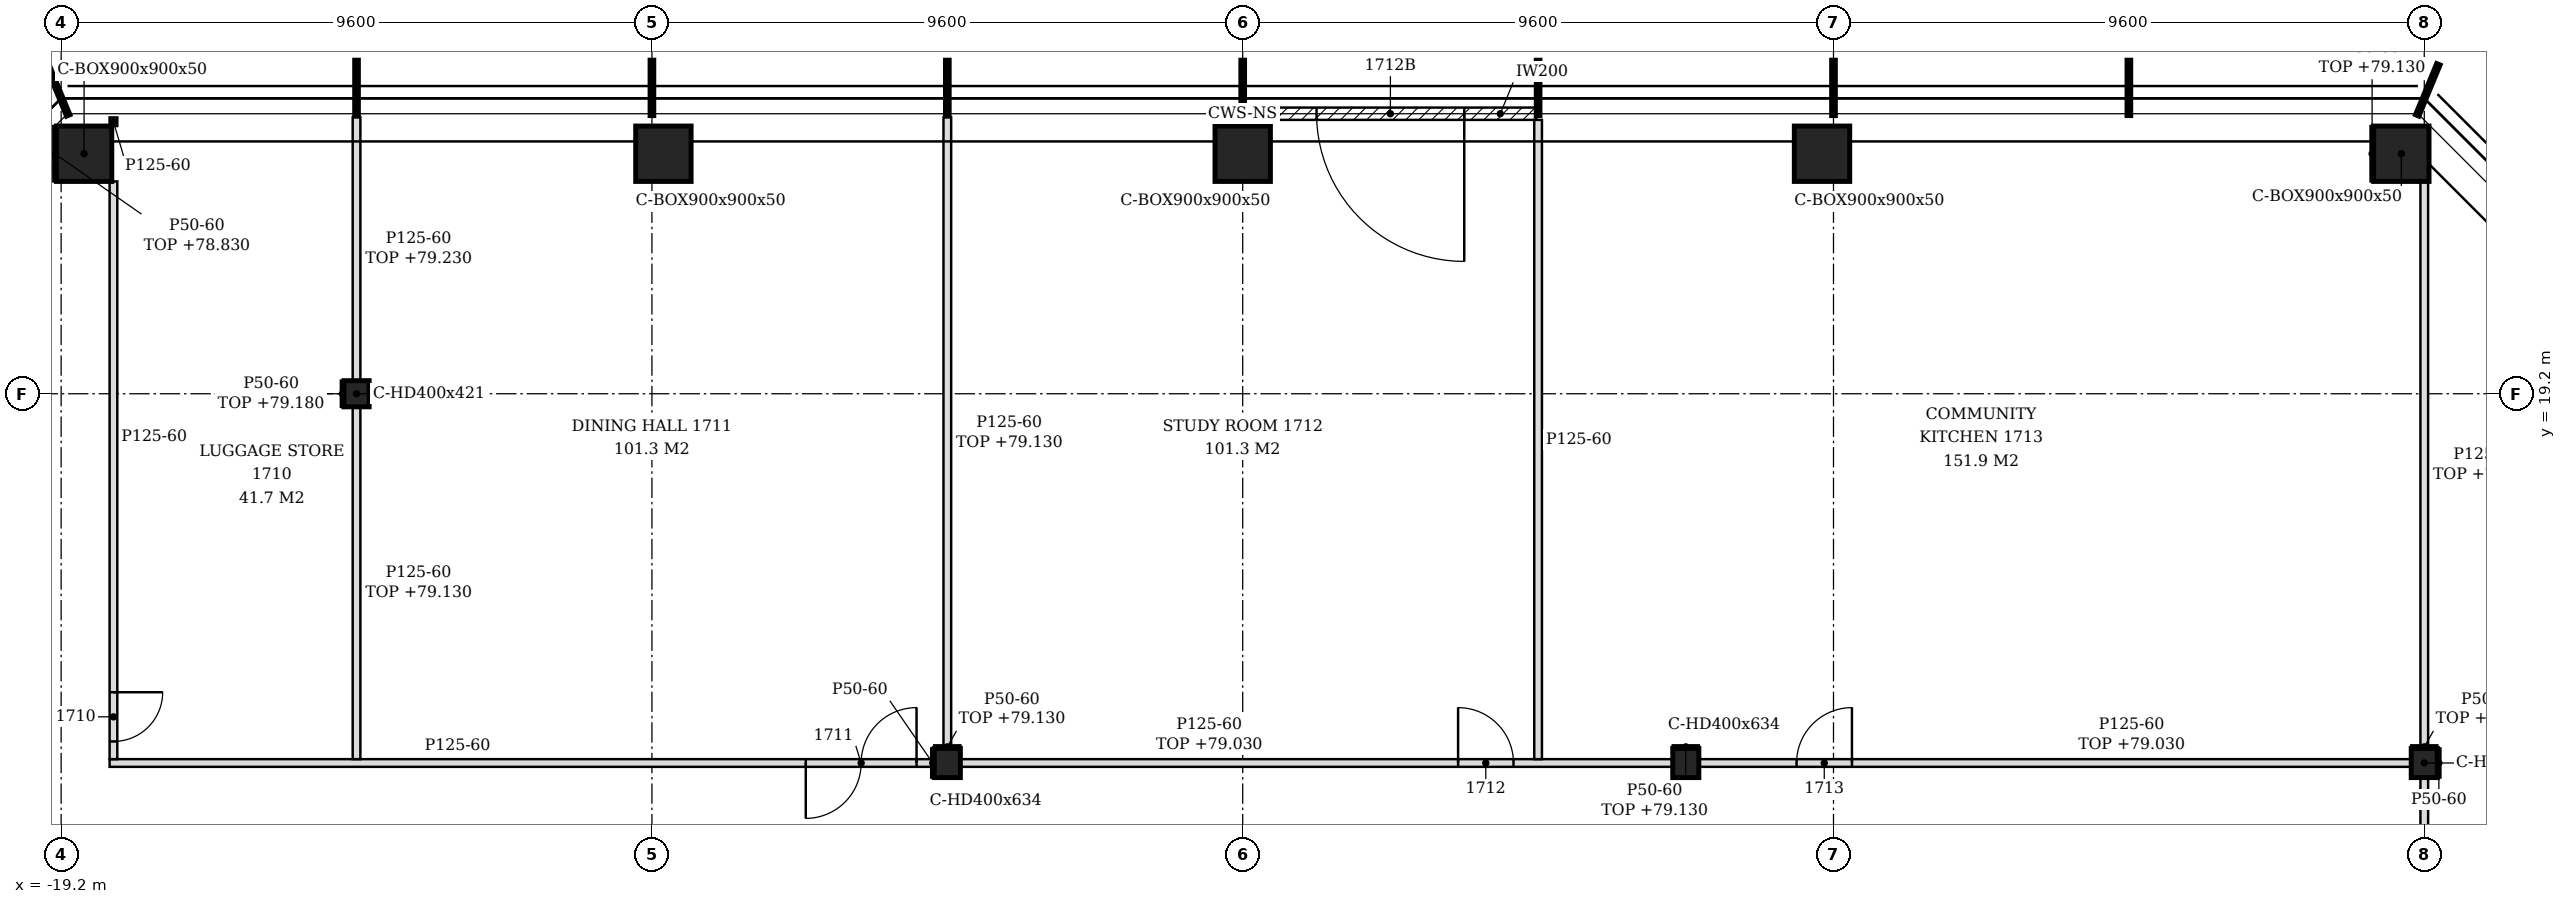
"""IFC4 building model, lengths in metres.
Left out: names, types, materials, properties, quantities, classifications, styles, units other than length and angle.
Written with IfcOpenShell. Run it as: python <this file> out.ifc"""

import sys

from ifc_helpers import new_model, si_unit, direction, frame, frame_2d, origin, origin_2d, place, context, subcontext, project, spatial, polyline, rectangle, hollow_rectangle, i_section, outline, extrude, element, fill, save


model = new_model("IFC4")
c1 = context("Model", 3, precision=1e-05, world=origin(), true_north=direction((0.0, 1.0)))
c2 = subcontext(c1, "Body", "Model", "MODEL_VIEW")
j1 = project(units=[si_unit("LENGTHUNIT", "METRE"), si_unit("PLANEANGLEUNIT", "RADIAN")], contexts=[c1])
p1 = place(None, origin())
s1 = spatial("IfcSite", under=j1, at=p1, CompositionType="ELEMENT")
p2 = place(p1, origin())
s2 = spatial("IfcBuilding", under=s1, at=p2, CompositionType="ELEMENT")
p3 = place(p2, frame((0.0, 0.0, 76.2)))
s3 = spatial("IfcBuildingStorey", under=s2, at=p3, CompositionType="ELEMENT", Elevation=76.2)
for number, where, z_axis, x_axis in (
    (1, (18.827, 23.1, -0.15), (0.0, 0.0, 1.0), (1.0, 0.0, 0.0)),
    (2, (9.414, 23.1, -0.15), (0.0, 0.0, 1.0), (1.0, 0.0, 0.0)),
    (3, (0.0, 23.1, -0.15), (0.0, 0.0, 1.0), (1.0, 0.0, 0.0)),
    (4, (-9.414, 23.1, -0.15), (0.0, 0.0, 1.0), (1.0, 0.0, 0.0)),
    (5, (-18.827, 23.1, -0.15), (0.0, 0.0, 1.0), (1.0, 0.0, 0.0)),
):
    element("IfcColumn", number, at=place(p3, frame(where, z_axis=z_axis, x_axis=x_axis)), inside=s3, PredefinedType="COLUMN", context=c2, shape_type="SweptSolid", body=[
        extrude(hollow_rectangle(XDim=0.9, YDim=0.9, WallThickness=0.05, at=origin_2d()), origin(), (0.0, 0.0, 1.0), 3.6),
    ])
for number, where, z_axis, x_axis in (
    (6, (-4.8, 13.2, -0.15), (0.0, 0.0, 1.0), (1.0, 0.0, 0.0)),
    (7, (7.2, 13.2, -0.15), (0.0, 0.0, 1.0), (1.0, 0.0, 0.0)),
    (8, (19.2, 13.2, -0.15), (0.0, 0.0, 1.0), (1.0, 0.0, 0.0)),
):
    element("IfcColumn", number, at=place(p3, frame(where, z_axis=z_axis, x_axis=x_axis)), inside=s3, PredefinedType="COLUMN", context=c2, shape_type="SweptSolid", body=[
        extrude(i_section(OverallWidth=0.424, OverallDepth=0.474, WebThickness=0.048, FlangeThickness=0.077, FilletRadius=0.015, at=origin_2d()), origin(), (0.0, 0.0, 1.0), 3.6),
    ])
p4 = place(p3, frame((-14.4, 19.2, -0.15), z_axis=(0.0, 0.0, 1.0), x_axis=(1.0, 0.0, 0.0)))
e9 = element("IfcColumn", 9, at=p4, inside=s3, PredefinedType="COLUMN", context=c2, shape_type="SweptSolid", body=[
    extrude(i_section(OverallWidth=0.409, OverallDepth=0.425, WebThickness=0.033, FlangeThickness=0.052, FilletRadius=0.015, at=origin_2d()), origin(), (0.0, 0.0, 1.0), 3.6),
])
p5 = place(p3, frame((4.77, 23.75, 0.0), z_axis=(0.0, 0.0, 1.0), x_axis=(-1.0, 0.0, 0.0)))
e10 = element("IfcWall", 10, at=p5, inside=s3, PredefinedType="NOTDEFINED", context=c2, shape_type="SweptSolid", body=[
    extrude(rectangle(XDim=4.74, YDim=0.2, at=frame_2d((2.37, 0.0))), origin(), (0.0, 0.0, 1.0), 3.45),
])
p6 = place(p5, frame((1.17, 0.0, 0.0)))
e11 = element("IfcOpeningElement", 11, at=p6, cuts=e10, PredefinedType="OPENING", context=c2, shape_type="SweptSolid", body=[
    extrude(rectangle(XDim=2.4, YDim=2.4, at=frame_2d((1.2, 1.2))), frame((0.0, 0.11, 0.0), z_axis=(0.0, -1.0, 0.0), x_axis=(1.0, 0.0, 0.0)), (0.0, 0.0, 1.0), 0.22),
])
p7 = place(p3, frame((19.2, 2.637, 0.0), z_axis=(0.0, 0.0, 1.0), x_axis=(0.0, 1.0, 0.0)))
e12 = element("IfcWall", 12, at=p7, inside=s3, PredefinedType="PARTITIONING", context=c2, shape_type="SweptSolid", body=[
    extrude(rectangle(XDim=10.326, YDim=0.125, at=frame_2d((5.163, 0.0))), origin(), (0.0, 0.0, 1.0), 2.83),
])
p8 = place(p7, frame((5.763, 0.0, 0.0)))
e13 = element("IfcOpeningElement", 13, at=p8, cuts=e12, PredefinedType="OPENING", context=c2, shape_type="SweptSolid", body=[
    extrude(rectangle(XDim=0.9, YDim=2.1, at=frame_2d((0.45, 1.05))), frame((0.0, 0.073, 0.0), z_axis=(0.0, -1.0, 0.0), x_axis=(1.0, 0.0, 0.0)), (0.0, 0.0, 1.0), 0.145),
])
p9 = place(p3, frame((-18.413, 13.2, 0.0), z_axis=(0.0, 0.0, 1.0), x_axis=(1.0, 0.0, 0.0)))
e14 = element("IfcWall", 14, at=p9, inside=s3, PredefinedType="PARTITIONING", context=c2, shape_type="SweptSolid", body=[
    extrude(outline(polyline([(0.0, 0.0), (13.401, 0.0), (13.4, 3.45), (4.163, 3.45), (4.16, 2.93), (3.863, 2.93), (3.861, 3.45), (0.0, 3.45), (0.0, 0.0)])), frame((0.0, 0.062, 0.0), z_axis=(0.0, -1.0, 0.0), x_axis=(1.0, 0.0, 0.0)), (0.0, 0.0, 1.0), 0.125),
])
p10 = place(p9, frame((11.312, 0.0, 0.0)))
e15 = element("IfcOpeningElement", 15, at=p10, cuts=e14, PredefinedType="OPENING", context=c2, shape_type="SweptSolid", body=[
    extrude(rectangle(XDim=1.8, YDim=2.1, at=frame_2d((0.9, 1.05))), frame((0.0, 0.073, 0.0), z_axis=(0.0, -1.0, 0.0), x_axis=(1.0, 0.0, 0.0)), (0.0, 0.0, 1.0), 0.145),
])
p11 = place(p3, frame((-4.588, 13.2, 0.0), z_axis=(0.0, 0.0, 1.0), x_axis=(1.0, 0.0, 0.0)))
e16 = element("IfcWall", 16, at=p11, inside=s3, PredefinedType="PARTITIONING", context=c2, shape_type="SweptSolid", body=[
    extrude(rectangle(XDim=11.576, YDim=0.125, at=frame_2d((5.788, 0.0))), origin(), (0.0, 0.0, 1.0), 2.83),
])
p12 = place(p11, frame((8.088, 0.0, 0.0)))
e17 = element("IfcOpeningElement", 17, at=p12, cuts=e16, PredefinedType="OPENING", context=c2, shape_type="SweptSolid", body=[
    extrude(rectangle(XDim=0.9, YDim=2.1, at=frame_2d((0.45, 1.05))), frame((0.0, 0.073, 0.0), z_axis=(0.0, -1.0, 0.0), x_axis=(1.0, 0.0, 0.0)), (0.0, 0.0, 1.0), 0.145),
])
p13 = place(p3, frame((7.412, 13.2, 0.0), z_axis=(0.0, 0.0, 1.0), x_axis=(1.0, 0.0, 0.0)))
e18 = element("IfcWall", 18, at=p13, inside=s3, PredefinedType="PARTITIONING", context=c2, shape_type="SweptSolid", body=[
    extrude(rectangle(XDim=11.576, YDim=0.125, at=frame_2d((5.788, 0.0))), origin(), (0.0, 0.0, 1.0), 2.83),
])
p14 = place(p13, frame((1.588, 0.0, 0.0)))
e19 = element("IfcOpeningElement", 19, at=p14, cuts=e18, PredefinedType="OPENING", context=c2, shape_type="SweptSolid", body=[
    extrude(rectangle(XDim=0.9, YDim=2.1, at=frame_2d((0.45, 1.05))), frame((0.0, 0.073, 0.0), z_axis=(0.0, -1.0, 0.0), x_axis=(1.0, 0.0, 0.0)), (0.0, 0.0, 1.0), 0.145),
])
p15 = place(p3, frame((-18.35, 13.262, 0.0), z_axis=(0.0, 0.0, 1.0), x_axis=(0.0, 1.0, 0.0)))
e20 = element("IfcWall", 20, at=p15, inside=s3, PredefinedType="PARTITIONING", context=c2, shape_type="SweptSolid", body=[
    extrude(outline(polyline([(0.0, 0.0), (9.387, 0.0), (9.387, 3.45), (6.032, 3.45), (6.031, 2.98), (5.843, 2.98), (5.841, 3.45), (1.248, 3.45), (1.246, 2.83), (1.028, 2.83), (1.025, 3.45), (0.0, 3.45), (0.0, 0.0)])), frame((0.0, 0.062, 0.0), z_axis=(0.0, -1.0, 0.0), x_axis=(1.0, 0.0, 0.0)), (0.0, 0.0, 1.0), 0.125),
])
p16 = place(p15, frame((0.288, 0.0, 0.0)))
e21 = element("IfcOpeningElement", 21, at=p16, cuts=e20, PredefinedType="OPENING", context=c2, shape_type="SweptSolid", body=[
    extrude(rectangle(XDim=0.8, YDim=2.1, at=frame_2d((0.4, 1.05))), frame((0.0, 0.073, 0.0), z_axis=(0.0, -1.0, 0.0), x_axis=(1.0, 0.0, 0.0)), (0.0, 0.0, 1.0), 0.145),
])
p17 = place(p3, frame((-14.4, 13.262, 0.0), z_axis=(0.0, 0.0, 1.0), x_axis=(0.0, 1.0, 0.0)))
e22 = element("IfcWall", 22, at=p17, inside=s3, PredefinedType="PARTITIONING", context=c2, shape_type="SweptSolid", body=[
    extrude(rectangle(XDim=5.725, YDim=0.125, at=frame_2d((2.863, 0.0))), origin(), (0.0, 0.0, 1.0), 2.93),
])
p18 = place(p3, frame((4.8, 13.262, 0.0), z_axis=(0.0, 0.0, 1.0), x_axis=(0.0, 1.0, 0.0)))
e23 = element("IfcWall", 23, at=p18, inside=s3, PredefinedType="PARTITIONING", context=c2, shape_type="SweptSolid", body=[
    extrude(outline(polyline([(0.0, 0.0), (10.387, 0.0), (10.387, 3.45), (9.988, 3.45), (9.986, 2.93), (9.688, 2.93), (9.686, 3.45), (6.042, 3.45), (6.041, 2.88), (5.833, 2.88), (5.831, 3.45), (0.087, 3.45), (0.085, 2.83), (0.0, 2.83), (0.0, 0.0)])), frame((0.0, 0.062, 0.0), z_axis=(0.0, -1.0, 0.0), x_axis=(1.0, 0.0, 0.0)), (0.0, 0.0, 1.0), 0.125),
])
p19 = place(p3, frame((-4.8, 13.437, 0.0), z_axis=(0.0, 0.0, 1.0), x_axis=(0.0, 1.0, 0.0)))
e24 = element("IfcWall", 24, at=p19, inside=s3, PredefinedType="PARTITIONING", context=c2, shape_type="SweptSolid", body=[
    extrude(rectangle(XDim=10.253, YDim=0.125, at=frame_2d((5.126, 0.0))), origin(), (0.0, 0.0, 1.0), 2.93),
])
p20 = place(p3, frame((19.2, 13.437, 0.0), z_axis=(0.0, 0.0, 1.0), x_axis=(0.0, 1.0, 0.0)))
e25 = element("IfcWall", 25, at=p20, inside=s3, PredefinedType="PARTITIONING", context=c2, shape_type="SweptSolid", body=[
    extrude(outline(polyline([(0.0, 0.0), (9.213, 0.0), (9.213, 2.63), (8.733, 2.63), (8.731, 2.93), (0.0, 2.93), (0.0, 0.0)])), frame((0.0, 0.062, 0.0), z_axis=(0.0, -1.0, 0.0), x_axis=(1.0, 0.0, 0.0)), (0.0, 0.0, 1.0), 0.125),
])
p21 = place(p3, frame((-14.4, 19.413, 0.0), z_axis=(0.0, 0.0, 1.0), x_axis=(0.0, 1.0, 0.0)))
e26 = element("IfcWall", 26, at=p21, inside=s3, PredefinedType="PARTITIONING", context=c2, shape_type="SweptSolid", body=[
    extrude(outline(polyline([(0.0, 0.0), (4.277, 0.0), (4.278, 3.03), (3.837, 3.03), (3.835, 2.93), (3.538, 2.93), (3.535, 3.03), (0.0, 3.03), (0.0, 0.0)])), frame((0.0, 0.062, 0.0), z_axis=(0.0, -1.0, 0.0), x_axis=(1.0, 0.0, 0.0)), (0.0, 0.0, 1.0), 0.125),
])
p22 = place(p3, frame((-18.35, 23.55, 0.0), z_axis=(0.0, 0.0, 1.0), x_axis=(0.0, 1.0, 0.0)))
e27 = element("IfcWall", 27, at=p22, inside=s3, PredefinedType="PARTITIONING", context=c2, shape_type="SweptSolid", body=[
    extrude(rectangle(XDim=0.14, YDim=0.125, at=frame_2d((0.07, 0.0))), origin(), (0.0, 0.0, 1.0), 3.45),
])
p23 = place(p3, frame((19.437, 12.963, 0.0), z_axis=(0.0, 0.0, 1.0), x_axis=(0.0, 1.0, 0.0)))
e28 = element("IfcWall", 28, at=p23, inside=s3, PredefinedType="PARTITIONING", context=c2, shape_type="SweptSolid", body=[
    extrude(rectangle(XDim=0.474, YDim=0.05, at=frame_2d((0.237, 0.0))), origin(), (0.0, 0.0, 1.0), 3.45),
])
for number, where, z_axis, x_axis in (
    (29, (-5.012, 13.462, 0.0), (0.0, 0.0, 1.0), (1.0, 0.0, 0.0)),
    (30, (6.988, 13.462, 0.0), (0.0, 0.0, 1.0), (1.0, 0.0, 0.0)),
    (31, (18.988, 13.462, 0.0), (0.0, 0.0, 1.0), (1.0, 0.0, 0.0)),
):
    element("IfcWall", number, at=place(p3, frame(where, z_axis=z_axis, x_axis=x_axis)), inside=s3, PredefinedType="PARTITIONING", context=c2, shape_type="SweptSolid", body=[
        extrude(rectangle(XDim=0.424, YDim=0.05, at=frame_2d((0.212, 0.0))), origin(), (0.0, 0.0, 1.0), 2.93),
    ])
p24 = place(p3, frame((18.352, 22.65, 0.0), z_axis=(0.0, 0.0, 1.0), x_axis=(0.0, 1.0, 0.0)))
e32 = element("IfcWall", 32, at=p24, inside=s3, PredefinedType="PARTITIONING", context=c2, shape_type="SweptSolid", body=[
    extrude(rectangle(XDim=0.9, YDim=0.05, at=frame_2d((0.45, 0.0))), origin(), (0.0, 0.0, 1.0), 2.93),
])
p25 = place(p3, frame((-19.302, 22.65, 0.0), z_axis=(0.0, 0.0, 1.0), x_axis=(0.0, 1.0, 0.0)))
e33 = element("IfcWall", 33, at=p25, inside=s3, PredefinedType="PARTITIONING", context=c2, shape_type="SweptSolid", body=[
    extrude(rectangle(XDim=0.9, YDim=0.05, at=frame_2d((0.45, 0.0))), origin(), (0.0, 0.0, 1.0), 2.63),
])
p26 = place(p3, frame((-14.629, 18.988, 0.0), z_axis=(0.0, 0.0, 1.0), x_axis=(0.0, 1.0, 0.0)))
e34 = element("IfcWall", 34, at=p26, inside=s3, PredefinedType="PARTITIONING", context=c2, shape_type="SweptSolid", body=[
    extrude(rectangle(XDim=0.425, YDim=0.05, at=frame_2d((0.212, 0.0))), origin(), (0.0, 0.0, 1.0), 2.98),
])
p27 = place(p3, frame((-5.037, 12.963, 0.0), z_axis=(0.0, 0.0, 1.0), x_axis=(0.0, 1.0, 0.0)))
e35 = element("IfcWall", 35, at=p27, inside=s3, PredefinedType="PARTITIONING", context=c2, shape_type="SweptSolid", body=[
    extrude(rectangle(XDim=0.474, YDim=0.05, at=frame_2d((0.237, 0.0))), origin(), (0.0, 0.0, 1.0), 3.45),
])
p28 = place(p6, origin())
e36 = element("IfcDoor", 36, at=p28, inside=s3, OperationType="SINGLE_SWING_LEFT", PredefinedType="DOOR", context=c2, shape_type="SweptSolid", body=[
    extrude(rectangle(XDim=2.4, YDim=2.4, at=frame_2d((1.2, 1.2))), frame((0.0, 0.025, 0.0), z_axis=(0.0, -1.0, 0.0), x_axis=(1.0, 0.0, 0.0)), (0.0, 0.0, 1.0), 0.05),
])
fill(e11, e36)
p29 = place(p16, frame((0.8, 0.0, 0.0), z_axis=(0.0, 0.0, 1.0), x_axis=(-1.0, 0.0, 0.0)))
e37 = element("IfcDoor", 37, at=p29, inside=s3, OperationType="SINGLE_SWING_LEFT", PredefinedType="DOOR", context=c2, shape_type="SweptSolid", body=[
    extrude(rectangle(XDim=0.8, YDim=2.1, at=frame_2d((0.4, 1.05))), frame((0.0, 0.025, 0.0), z_axis=(0.0, -1.0, 0.0), x_axis=(1.0, 0.0, 0.0)), (0.0, 0.0, 1.0), 0.05),
])
fill(e21, e37)
p30 = place(p10, origin())
e38 = element("IfcDoor", 38, at=p30, inside=s3, OperationType="DOUBLE_DOOR_SINGLE_SWING", PredefinedType="DOOR", context=c2, shape_type="SweptSolid", body=[
    extrude(rectangle(XDim=1.8, YDim=2.1, at=frame_2d((0.9, 1.05))), frame((0.0, 0.025, 0.0), z_axis=(0.0, -1.0, 0.0), x_axis=(1.0, 0.0, 0.0)), (0.0, 0.0, 1.0), 0.05),
])
fill(e15, e38)
p31 = place(p12, origin())
e39 = element("IfcDoor", 39, at=p31, inside=s3, OperationType="SINGLE_SWING_LEFT", PredefinedType="DOOR", context=c2, shape_type="SweptSolid", body=[
    extrude(rectangle(XDim=0.9, YDim=2.1, at=frame_2d((0.45, 1.05))), frame((0.0, 0.025, 0.0), z_axis=(0.0, -1.0, 0.0), x_axis=(1.0, 0.0, 0.0)), (0.0, 0.0, 1.0), 0.05),
])
fill(e17, e39)
p32 = place(p14, origin())
e40 = element("IfcDoor", 40, at=p32, inside=s3, OperationType="SINGLE_SWING_RIGHT", PredefinedType="DOOR", context=c2, shape_type="SweptSolid", body=[
    extrude(rectangle(XDim=0.9, YDim=2.1, at=frame_2d((0.45, 1.05))), frame((0.0, 0.025, 0.0), z_axis=(0.0, -1.0, 0.0), x_axis=(1.0, 0.0, 0.0)), (0.0, 0.0, 1.0), 0.05),
])
fill(e19, e40)
save(model, sys.argv[1])
